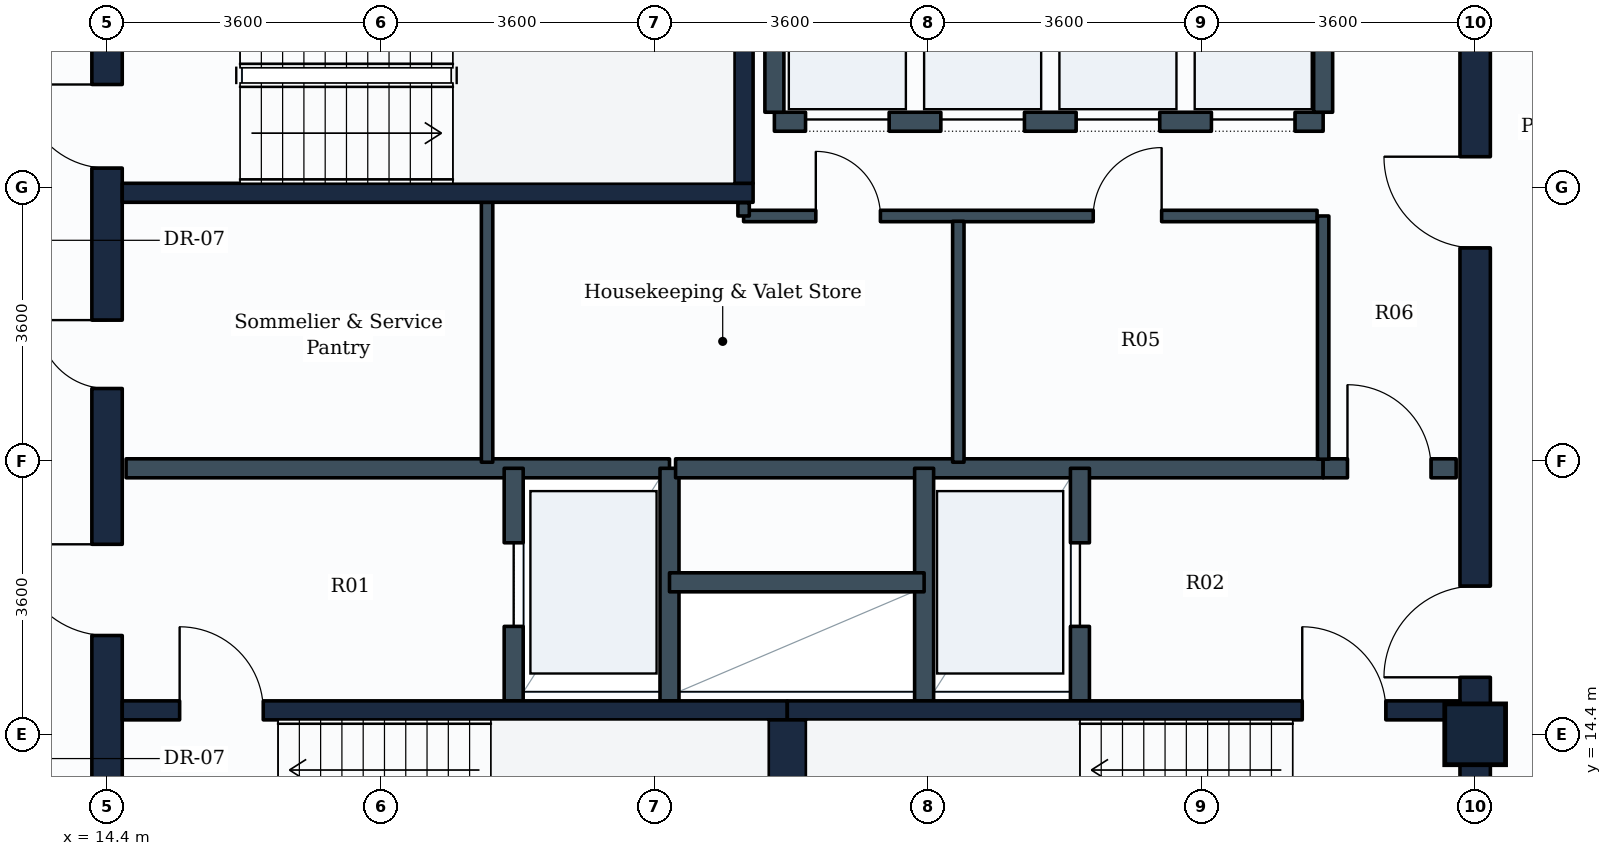
"""IFC4 building model, lengths in metres.
Left out: names, types, materials, properties, quantities, classifications, styles, units other than length and angle.
Written with IfcOpenShell. Run it as: python <this file> out.ifc"""

import sys

from ifc_helpers import new_model, si_unit, direction, frame, frame_2d, origin, origin_2d, place, context, subcontext, project, spatial, rectangle, extrude, element, fill, save


model = new_model("IFC4")
c1 = context("Model", 3, precision=1e-05, world=origin(), true_north=direction((0.0, 1.0)))
c2 = subcontext(c1, "Body", "Model", "MODEL_VIEW")
j1 = project(units=[si_unit("LENGTHUNIT", "METRE"), si_unit("PLANEANGLEUNIT", "RADIAN")], contexts=[c1])
p1 = place(None, origin())
s1 = spatial("IfcSite", under=j1, at=p1, CompositionType="ELEMENT")
p2 = place(p1, origin())
s2 = spatial("IfcBuilding", under=s1, at=p2, CompositionType="ELEMENT")
p3 = place(p2, frame((0.0, 0.0, 277.4)))
s3 = spatial("IfcBuildingStorey", under=s2, at=p3, CompositionType="ELEMENT", Elevation=277.4)
p4 = place(p3, frame((32.4, 14.4, 0.0), z_axis=(0.0, 0.0, 1.0), x_axis=(1.0, 0.0, 0.0)))
e1 = element("IfcColumn", 1, at=p4, inside=s3, PredefinedType="COLUMN", context=c2, shape_type="SweptSolid", body=[
    extrude(rectangle(XDim=0.8, YDim=0.8, at=origin_2d()), origin(), (0.0, 0.0, 1.0), 3.6),
])
p5 = place(p3, frame((14.4, 10.8, 0.0), z_axis=(0.0, 0.0, 1.0), x_axis=(0.0, 1.0, 0.0)))
e2 = element("IfcWall", 2, at=p5, inside=s3, PredefinedType="SHEAR", context=c2, shape_type="SweptSolid", body=[
    extrude(rectangle(XDim=14.4, YDim=0.4, at=frame_2d((7.2, 0.0))), origin(), (0.0, 0.0, 1.0), 3.35),
])
p6 = place(p5, frame((11.05, 0.0, 0.0)))
e3 = element("IfcOpeningElement", 3, at=p6, cuts=e2, PredefinedType="OPENING", context=c2, shape_type="SweptSolid", body=[
    extrude(rectangle(XDim=1.1, YDim=2.1, at=frame_2d((0.55, 1.05))), frame((0.0, 0.21, 0.0), z_axis=(0.0, -1.0, 0.0), x_axis=(1.0, 0.0, 0.0)), (0.0, 0.0, 1.0), 0.42),
])
p7 = place(p5, frame((4.9, 0.0, 0.0)))
e4 = element("IfcOpeningElement", 4, at=p7, cuts=e2, PredefinedType="OPENING", context=c2, shape_type="SweptSolid", body=[
    extrude(rectangle(XDim=1.2, YDim=2.1, at=frame_2d((0.6, 1.05))), frame((0.0, 0.21, 0.0), z_axis=(0.0, -1.0, 0.0), x_axis=(1.0, 0.0, 0.0)), (0.0, 0.0, 1.0), 0.42),
])
p8 = place(p5, frame((8.15, 0.0, 0.0)))
e5 = element("IfcOpeningElement", 5, at=p8, cuts=e2, PredefinedType="OPENING", context=c2, shape_type="SweptSolid", body=[
    extrude(rectangle(XDim=0.9, YDim=2.1, at=frame_2d((0.45, 1.05))), frame((0.0, 0.21, 0.0), z_axis=(0.0, -1.0, 0.0), x_axis=(1.0, 0.0, 0.0)), (0.0, 0.0, 1.0), 0.42),
])
p9 = place(p3, frame((32.4, 10.8, 0.0), z_axis=(0.0, 0.0, 1.0), x_axis=(0.0, 1.0, 0.0)))
e6 = element("IfcWall", 6, at=p9, inside=s3, PredefinedType="SHEAR", context=c2, shape_type="SweptSolid", body=[
    extrude(rectangle(XDim=14.4, YDim=0.4, at=frame_2d((7.2, 0.0))), origin(), (0.0, 0.0, 1.0), 3.35),
])
p10 = place(p9, frame((4.35, 0.0, 0.0)))
e7 = element("IfcOpeningElement", 7, at=p10, cuts=e6, PredefinedType="OPENING", context=c2, shape_type="SweptSolid", body=[
    extrude(rectangle(XDim=1.2, YDim=2.1, at=frame_2d((0.6, 1.05))), frame((0.0, 0.21, 0.0), z_axis=(0.0, -1.0, 0.0), x_axis=(1.0, 0.0, 0.0)), (0.0, 0.0, 1.0), 0.42),
])
p11 = place(p9, frame((10.0, 0.0, 0.0)))
e8 = element("IfcOpeningElement", 8, at=p11, cuts=e6, PredefinedType="OPENING", context=c2, shape_type="SweptSolid", body=[
    extrude(rectangle(XDim=1.2, YDim=2.1, at=frame_2d((0.6, 1.05))), frame((0.0, 0.21, 0.0), z_axis=(0.0, -1.0, 0.0), x_axis=(1.0, 0.0, 0.0)), (0.0, 0.0, 1.0), 0.42),
])
p12 = place(p3, frame((14.6, 14.715, 0.0), z_axis=(0.0, 0.0, 1.0), x_axis=(1.0, 0.0, 0.0)))
e9 = element("IfcWall", 9, at=p12, inside=s3, PredefinedType="SHEAR", context=c2, shape_type="SweptSolid", body=[
    extrude(rectangle(XDim=8.75, YDim=0.25, at=frame_2d((4.375, 0.0))), origin(), (0.0, 0.0, 1.0), 3.35),
])
p13 = place(p12, frame((0.755, 0.0, 0.0)))
e10 = element("IfcOpeningElement", 10, at=p13, cuts=e9, PredefinedType="OPENING", context=c2, shape_type="SweptSolid", body=[
    extrude(rectangle(XDim=1.1, YDim=2.1, at=frame_2d((0.55, 1.05))), frame((0.0, 0.135, 0.0), z_axis=(0.0, -1.0, 0.0), x_axis=(1.0, 0.0, 0.0)), (0.0, 0.0, 1.0), 0.27),
])
p14 = place(p3, frame((23.35, 14.715, 0.0), z_axis=(0.0, 0.0, 1.0), x_axis=(1.0, 0.0, 0.0)))
e11 = element("IfcWall", 11, at=p14, inside=s3, PredefinedType="SHEAR", context=c2, shape_type="SweptSolid", body=[
    extrude(rectangle(XDim=8.85, YDim=0.25, at=frame_2d((4.425, 0.0))), origin(), (0.0, 0.0, 1.0), 3.35),
])
p15 = place(p14, frame((6.775, 0.0, 0.0)))
e12 = element("IfcOpeningElement", 12, at=p15, cuts=e11, PredefinedType="OPENING", context=c2, shape_type="SweptSolid", body=[
    extrude(rectangle(XDim=1.1, YDim=2.1, at=frame_2d((0.55, 1.05))), frame((0.0, 0.135, 0.0), z_axis=(0.0, -1.0, 0.0), x_axis=(1.0, 0.0, 0.0)), (0.0, 0.0, 1.0), 0.27),
])
p16 = place(p3, frame((23.35, 11.75, 0.0), z_axis=(0.0, 0.0, 1.0), x_axis=(0.0, 1.0, 0.0)))
e13 = element("IfcWall", 13, at=p16, inside=s3, PredefinedType="SHEAR", context=c2, shape_type="SweptSolid", body=[
    extrude(rectangle(XDim=2.84, YDim=0.5, at=frame_2d((1.42, 0.0))), origin(), (0.0, 0.0, 1.0), 3.35),
])
p17 = place(p3, frame((14.6, 21.525, 0.0), z_axis=(0.0, 0.0, 1.0), x_axis=(1.0, 0.0, 0.0)))
e14 = element("IfcWall", 14, at=p17, inside=s3, PredefinedType="SHEAR", context=c2, shape_type="SweptSolid", body=[
    extrude(rectangle(XDim=8.3, YDim=0.25, at=frame_2d((4.15, 0.0))), origin(), (0.0, 0.0, 1.0), 3.35),
])
p18 = place(p3, frame((22.775, 21.65, 0.0), z_axis=(0.0, 0.0, 1.0), x_axis=(0.0, 1.0, 0.0)))
e15 = element("IfcWall", 15, at=p18, inside=s3, PredefinedType="SHEAR", context=c2, shape_type="SweptSolid", body=[
    extrude(rectangle(XDim=2.84, YDim=0.25, at=frame_2d((1.42, 0.0))), origin(), (0.0, 0.0, 1.0), 3.35),
])
p19 = place(p3, frame((14.65, 17.9, 0.0), z_axis=(0.0, 0.0, 1.0), x_axis=(1.0, 0.0, 0.0)))
e16 = element("IfcWall", 16, at=p19, inside=s3, PredefinedType="PARTITIONING", context=c2, shape_type="SweptSolid", body=[
    extrude(rectangle(XDim=7.15, YDim=0.25, at=frame_2d((3.575, 0.0))), origin(), (0.0, 0.0, 1.0), 3.335),
])
p20 = place(p3, frame((19.75, 14.84, 0.0), z_axis=(0.0, 0.0, 1.0), x_axis=(0.0, 1.0, 0.0)))
e17 = element("IfcWall", 17, at=p20, inside=s3, PredefinedType="PARTITIONING", context=c2, shape_type="SweptSolid", body=[
    extrude(rectangle(XDim=3.06, YDim=0.25, at=frame_2d((1.53, 0.0))), origin(), (0.0, 0.0, 1.0), 3.335),
])
p21 = place(p20, frame((0.98, 0.0, 0.0)))
e18 = element("IfcOpeningElement", 18, at=p21, cuts=e17, PredefinedType="OPENING", context=c2, shape_type="SweptSolid", body=[
    extrude(rectangle(XDim=1.1, YDim=2.1, at=frame_2d((0.55, 1.05))), frame((0.0, 0.135, 0.0), z_axis=(0.0, -1.0, 0.0), x_axis=(1.0, 0.0, 0.0)), (0.0, 0.0, 1.0), 0.27),
])
p22 = place(p3, frame((21.8, 14.84, 0.0), z_axis=(0.0, 0.0, 1.0), x_axis=(0.0, 1.0, 0.0)))
e19 = element("IfcWall", 19, at=p22, inside=s3, PredefinedType="PARTITIONING", context=c2, shape_type="SweptSolid", body=[
    extrude(rectangle(XDim=3.06, YDim=0.25, at=frame_2d((1.53, 0.0))), origin(), (0.0, 0.0, 1.0), 3.335),
])
p23 = place(p3, frame((21.88, 17.9, 0.0), z_axis=(0.0, 0.0, 1.0), x_axis=(1.0, 0.0, 0.0)))
e20 = element("IfcWall", 20, at=p23, inside=s3, PredefinedType="PARTITIONING", context=c2, shape_type="SweptSolid", body=[
    extrude(rectangle(XDim=8.52, YDim=0.25, at=frame_2d((4.26, 0.0))), origin(), (0.0, 0.0, 1.0), 3.335),
])
p24 = place(p3, frame((30.4, 17.9, 0.0), z_axis=(0.0, 0.0, 1.0), x_axis=(1.0, 0.0, 0.0)))
e21 = element("IfcWall", 21, at=p24, inside=s3, PredefinedType="PARTITIONING", context=c2, shape_type="SweptSolid", body=[
    extrude(rectangle(XDim=1.75, YDim=0.25, at=frame_2d((0.875, 0.0))), origin(), (0.0, 0.0, 1.0), 3.335),
])
p25 = place(p24, frame((0.32, 0.0, 0.0)))
e22 = element("IfcOpeningElement", 22, at=p25, cuts=e21, PredefinedType="OPENING", context=c2, shape_type="SweptSolid", body=[
    extrude(rectangle(XDim=1.1, YDim=2.1, at=frame_2d((0.55, 1.05))), frame((0.0, 0.135, 0.0), z_axis=(0.0, -1.0, 0.0), x_axis=(1.0, 0.0, 0.0)), (0.0, 0.0, 1.0), 0.27),
])
p26 = place(p3, frame((25.15, 14.84, 0.0), z_axis=(0.0, 0.0, 1.0), x_axis=(0.0, 1.0, 0.0)))
e23 = element("IfcWall", 23, at=p26, inside=s3, PredefinedType="PARTITIONING", context=c2, shape_type="SweptSolid", body=[
    extrude(rectangle(XDim=3.06, YDim=0.25, at=frame_2d((1.53, 0.0))), origin(), (0.0, 0.0, 1.0), 3.335),
])
p27 = place(p3, frame((27.2, 14.84, 0.0), z_axis=(0.0, 0.0, 1.0), x_axis=(0.0, 1.0, 0.0)))
e24 = element("IfcWall", 24, at=p27, inside=s3, PredefinedType="PARTITIONING", context=c2, shape_type="SweptSolid", body=[
    extrude(rectangle(XDim=3.06, YDim=0.25, at=frame_2d((1.53, 0.0))), origin(), (0.0, 0.0, 1.0), 3.335),
])
p28 = place(p27, frame((0.98, 0.0, 0.0)))
e25 = element("IfcOpeningElement", 25, at=p28, cuts=e24, PredefinedType="OPENING", context=c2, shape_type="SweptSolid", body=[
    extrude(rectangle(XDim=1.1, YDim=2.1, at=frame_2d((0.55, 1.05))), frame((0.0, 0.135, 0.0), z_axis=(0.0, -1.0, 0.0), x_axis=(1.0, 0.0, 0.0)), (0.0, 0.0, 1.0), 0.27),
])
p29 = place(p3, frame((21.8, 16.4, 0.0), z_axis=(0.0, 0.0, 1.0), x_axis=(1.0, 0.0, 0.0)))
e26 = element("IfcWall", 26, at=p29, inside=s3, PredefinedType="PARTITIONING", context=c2, shape_type="SweptSolid", body=[
    extrude(rectangle(XDim=3.35, YDim=0.25, at=frame_2d((1.675, 0.0))), origin(), (0.0, 0.0, 1.0), 3.335),
])
p30 = place(p3, frame((23.18, 22.46, 0.0), z_axis=(0.0, 0.0, 1.0), x_axis=(1.0, 0.0, 0.0)))
e27 = element("IfcWall", 27, at=p30, inside=s3, PredefinedType="PARTITIONING", context=c2, shape_type="SweptSolid", body=[
    extrude(rectangle(XDim=7.22, YDim=0.25, at=frame_2d((3.61, 0.0))), origin(), (0.0, 0.0, 1.0), 3.335),
])
p31 = place(p30, frame((0.41, 0.0, 0.0)))
e28 = element("IfcOpeningElement", 28, at=p31, cuts=e27, PredefinedType="OPENING", context=c2, shape_type="SweptSolid", body=[
    extrude(rectangle(XDim=1.1, YDim=2.1, at=frame_2d((0.55, 1.05))), frame((0.0, 0.135, 0.0), z_axis=(0.0, -1.0, 0.0), x_axis=(1.0, 0.0, 0.0)), (0.0, 0.0, 1.0), 0.27),
])
p32 = place(p30, frame((2.19, 0.0, 0.0)))
e29 = element("IfcOpeningElement", 29, at=p32, cuts=e27, PredefinedType="OPENING", context=c2, shape_type="SweptSolid", body=[
    extrude(rectangle(XDim=1.1, YDim=2.1, at=frame_2d((0.55, 1.05))), frame((0.0, 0.135, 0.0), z_axis=(0.0, -1.0, 0.0), x_axis=(1.0, 0.0, 0.0)), (0.0, 0.0, 1.0), 0.27),
])
p33 = place(p30, frame((3.97, 0.0, 0.0)))
e30 = element("IfcOpeningElement", 30, at=p33, cuts=e27, PredefinedType="OPENING", context=c2, shape_type="SweptSolid", body=[
    extrude(rectangle(XDim=1.1, YDim=2.1, at=frame_2d((0.55, 1.05))), frame((0.0, 0.135, 0.0), z_axis=(0.0, -1.0, 0.0), x_axis=(1.0, 0.0, 0.0)), (0.0, 0.0, 1.0), 0.27),
])
p34 = place(p30, frame((5.75, 0.0, 0.0)))
e31 = element("IfcOpeningElement", 31, at=p34, cuts=e27, PredefinedType="OPENING", context=c2, shape_type="SweptSolid", body=[
    extrude(rectangle(XDim=1.1, YDim=2.1, at=frame_2d((0.55, 1.05))), frame((0.0, 0.135, 0.0), z_axis=(0.0, -1.0, 0.0), x_axis=(1.0, 0.0, 0.0)), (0.0, 0.0, 1.0), 0.27),
])
for number, where, z_axis, x_axis in (
    (32, (23.18, 22.585, 0.0), (0.0, 0.0, 1.0), (0.0, 1.0, 0.0)),
    (33, (30.4, 22.585, 0.0), (0.0, 0.0, 1.0), (0.0, 1.0, 0.0)),
):
    element("IfcWall", number, at=place(p3, frame(where, z_axis=z_axis, x_axis=x_axis)), inside=s3, PredefinedType="PARTITIONING", context=c2, shape_type="SweptSolid", body=[
        extrude(rectangle(XDim=2.315, YDim=0.25, at=frame_2d((1.157, 0.0))), origin(), (0.0, 0.0, 1.0), 3.335),
    ])
p35 = place(p3, frame((22.775, 21.22, 0.0), z_axis=(0.0, 0.0, 1.0), x_axis=(1.0, 0.0, 0.0)))
e34 = element("IfcWall", 34, at=p35, inside=s3, PredefinedType="PARTITIONING", context=c2, shape_type="SweptSolid", body=[
    extrude(rectangle(XDim=7.545, YDim=0.15, at=frame_2d((3.772, 0.0))), origin(), (0.0, 0.0, 1.0), 3.335),
])
p36 = place(p35, frame((0.95, 0.0, 0.0)))
e35 = element("IfcOpeningElement", 35, at=p36, cuts=e34, PredefinedType="OPENING", context=c2, shape_type="SweptSolid", body=[
    extrude(rectangle(XDim=0.85, YDim=2.1, at=frame_2d((0.425, 1.05))), frame((0.0, 0.085, 0.0), z_axis=(0.0, -1.0, 0.0), x_axis=(1.0, 0.0, 0.0)), (0.0, 0.0, 1.0), 0.17),
])
p37 = place(p35, frame((4.6, 0.0, 0.0)))
e36 = element("IfcOpeningElement", 36, at=p37, cuts=e34, PredefinedType="OPENING", context=c2, shape_type="SweptSolid", body=[
    extrude(rectangle(XDim=0.9, YDim=2.1, at=frame_2d((0.45, 1.05))), frame((0.0, 0.085, 0.0), z_axis=(0.0, -1.0, 0.0), x_axis=(1.0, 0.0, 0.0)), (0.0, 0.0, 1.0), 0.17),
])
p38 = place(p3, frame((22.775, 21.22, 0.0), z_axis=(0.0, 0.0, 1.0), x_axis=(0.0, 1.0, 0.0)))
e37 = element("IfcWall", 37, at=p38, inside=s3, PredefinedType="PARTITIONING", context=c2, shape_type="SweptSolid", body=[
    extrude(rectangle(XDim=0.175, YDim=0.15, at=frame_2d((0.087, 0.0))), origin(), (0.0, 0.0, 1.0), 3.335),
])
p39 = place(p3, frame((30.4, 18.02, 0.0), z_axis=(0.0, 0.0, 1.0), x_axis=(0.0, 1.0, 0.0)))
e38 = element("IfcWall", 38, at=p39, inside=s3, PredefinedType="PARTITIONING", context=c2, shape_type="SweptSolid", body=[
    extrude(rectangle(XDim=3.2, YDim=0.15, at=frame_2d((1.6, 0.0))), origin(), (0.0, 0.0, 1.0), 3.335),
])
p40 = place(p3, frame((19.4, 17.98, 0.0), z_axis=(0.0, 0.0, 1.0), x_axis=(0.0, 1.0, 0.0)))
e39 = element("IfcWall", 39, at=p40, inside=s3, PredefinedType="PARTITIONING", context=c2, shape_type="SweptSolid", body=[
    extrude(rectangle(XDim=3.42, YDim=0.15, at=frame_2d((1.71, 0.0))), origin(), (0.0, 0.0, 1.0), 3.335),
])
p41 = place(p3, frame((25.6, 17.98, 0.0), z_axis=(0.0, 0.0, 1.0), x_axis=(0.0, 1.0, 0.0)))
e40 = element("IfcWall", 40, at=p41, inside=s3, PredefinedType="PARTITIONING", context=c2, shape_type="SweptSolid", body=[
    extrude(rectangle(XDim=3.17, YDim=0.15, at=frame_2d((1.585, 0.0))), origin(), (0.0, 0.0, 1.0), 3.335),
])
p42 = place(p13, origin())
e41 = element("IfcDoor", 41, at=p42, inside=s3, OperationType="SINGLE_SWING_LEFT", PredefinedType="DOOR", context=c2, shape_type="SweptSolid", body=[
    extrude(rectangle(XDim=1.1, YDim=2.1, at=frame_2d((0.55, 1.05))), frame((0.0, 0.025, 0.0), z_axis=(0.0, -1.0, 0.0), x_axis=(1.0, 0.0, 0.0)), (0.0, 0.0, 1.0), 0.05),
])
fill(e10, e41)
p43 = place(p15, origin())
e42 = element("IfcDoor", 42, at=p43, inside=s3, OperationType="SINGLE_SWING_LEFT", PredefinedType="DOOR", context=c2, shape_type="SweptSolid", body=[
    extrude(rectangle(XDim=1.1, YDim=2.1, at=frame_2d((0.55, 1.05))), frame((0.0, 0.025, 0.0), z_axis=(0.0, -1.0, 0.0), x_axis=(1.0, 0.0, 0.0)), (0.0, 0.0, 1.0), 0.05),
])
fill(e12, e42)
p44 = place(p6, origin())
e43 = element("IfcDoor", 43, at=p44, inside=s3, OperationType="SINGLE_SWING_RIGHT", PredefinedType="DOOR", context=c2, shape_type="SweptSolid", body=[
    extrude(rectangle(XDim=1.1, YDim=2.1, at=frame_2d((0.55, 1.05))), frame((0.0, 0.025, 0.0), z_axis=(0.0, -1.0, 0.0), x_axis=(1.0, 0.0, 0.0)), (0.0, 0.0, 1.0), 0.05),
])
fill(e3, e43)
p45 = place(p21, origin())
e44 = element("IfcDoor", 44, at=p45, inside=s3, OperationType="SLIDING_TO_LEFT", PredefinedType="DOOR", context=c2, shape_type="SweptSolid", body=[
    extrude(rectangle(XDim=1.1, YDim=2.1, at=frame_2d((0.55, 1.05))), frame((0.0, 0.025, 0.0), z_axis=(0.0, -1.0, 0.0), x_axis=(1.0, 0.0, 0.0)), (0.0, 0.0, 1.0), 0.05),
])
fill(e18, e44)
p46 = place(p28, origin())
e45 = element("IfcDoor", 45, at=p46, inside=s3, OperationType="SLIDING_TO_LEFT", PredefinedType="DOOR", context=c2, shape_type="SweptSolid", body=[
    extrude(rectangle(XDim=1.1, YDim=2.1, at=frame_2d((0.55, 1.05))), frame((0.0, 0.025, 0.0), z_axis=(0.0, -1.0, 0.0), x_axis=(1.0, 0.0, 0.0)), (0.0, 0.0, 1.0), 0.05),
])
fill(e25, e45)
p47 = place(p7, origin())
e46 = element("IfcDoor", 46, at=p47, inside=s3, OperationType="SINGLE_SWING_RIGHT", PredefinedType="DOOR", context=c2, shape_type="SweptSolid", body=[
    extrude(rectangle(XDim=1.2, YDim=2.1, at=frame_2d((0.6, 1.05))), frame((0.0, 0.025, 0.0), z_axis=(0.0, -1.0, 0.0), x_axis=(1.0, 0.0, 0.0)), (0.0, 0.0, 1.0), 0.05),
])
fill(e4, e46)
p48 = place(p10, origin())
e47 = element("IfcDoor", 47, at=p48, inside=s3, OperationType="SINGLE_SWING_LEFT", PredefinedType="DOOR", context=c2, shape_type="SweptSolid", body=[
    extrude(rectangle(XDim=1.2, YDim=2.1, at=frame_2d((0.6, 1.05))), frame((0.0, 0.025, 0.0), z_axis=(0.0, -1.0, 0.0), x_axis=(1.0, 0.0, 0.0)), (0.0, 0.0, 1.0), 0.05),
])
fill(e7, e47)
p49 = place(p25, origin())
e48 = element("IfcDoor", 48, at=p49, inside=s3, OperationType="SINGLE_SWING_LEFT", PredefinedType="DOOR", context=c2, shape_type="SweptSolid", body=[
    extrude(rectangle(XDim=1.1, YDim=2.1, at=frame_2d((0.55, 1.05))), frame((0.0, 0.025, 0.0), z_axis=(0.0, -1.0, 0.0), x_axis=(1.0, 0.0, 0.0)), (0.0, 0.0, 1.0), 0.05),
])
fill(e22, e48)
p50 = place(p31, origin())
e49 = element("IfcDoor", 49, at=p50, inside=s3, OperationType="SLIDING_TO_LEFT", PredefinedType="DOOR", context=c2, shape_type="SweptSolid", body=[
    extrude(rectangle(XDim=1.1, YDim=2.1, at=frame_2d((0.55, 1.05))), frame((0.0, 0.025, 0.0), z_axis=(0.0, -1.0, 0.0), x_axis=(1.0, 0.0, 0.0)), (0.0, 0.0, 1.0), 0.05),
])
fill(e28, e49)
p51 = place(p32, origin())
e50 = element("IfcDoor", 50, at=p51, inside=s3, OperationType="SLIDING_TO_LEFT", PredefinedType="DOOR", context=c2, shape_type="SweptSolid", body=[
    extrude(rectangle(XDim=1.1, YDim=2.1, at=frame_2d((0.55, 1.05))), frame((0.0, 0.025, 0.0), z_axis=(0.0, -1.0, 0.0), x_axis=(1.0, 0.0, 0.0)), (0.0, 0.0, 1.0), 0.05),
])
fill(e29, e50)
p52 = place(p33, origin())
e51 = element("IfcDoor", 51, at=p52, inside=s3, OperationType="SLIDING_TO_LEFT", PredefinedType="DOOR", context=c2, shape_type="SweptSolid", body=[
    extrude(rectangle(XDim=1.1, YDim=2.1, at=frame_2d((0.55, 1.05))), frame((0.0, 0.025, 0.0), z_axis=(0.0, -1.0, 0.0), x_axis=(1.0, 0.0, 0.0)), (0.0, 0.0, 1.0), 0.05),
])
fill(e30, e51)
p53 = place(p34, origin())
e52 = element("IfcDoor", 52, at=p53, inside=s3, OperationType="SLIDING_TO_LEFT", PredefinedType="DOOR", context=c2, shape_type="SweptSolid", body=[
    extrude(rectangle(XDim=1.1, YDim=2.1, at=frame_2d((0.55, 1.05))), frame((0.0, 0.025, 0.0), z_axis=(0.0, -1.0, 0.0), x_axis=(1.0, 0.0, 0.0)), (0.0, 0.0, 1.0), 0.05),
])
fill(e31, e52)
p54 = place(p11, origin())
e53 = element("IfcDoor", 53, at=p54, inside=s3, OperationType="SINGLE_SWING_RIGHT", PredefinedType="DOOR", context=c2, shape_type="SweptSolid", body=[
    extrude(rectangle(XDim=1.2, YDim=2.1, at=frame_2d((0.6, 1.05))), frame((0.0, 0.025, 0.0), z_axis=(0.0, -1.0, 0.0), x_axis=(1.0, 0.0, 0.0)), (0.0, 0.0, 1.0), 0.05),
])
fill(e8, e53)
p55 = place(p8, origin())
e54 = element("IfcDoor", 54, at=p55, inside=s3, OperationType="SINGLE_SWING_RIGHT", PredefinedType="DOOR", context=c2, shape_type="SweptSolid", body=[
    extrude(rectangle(XDim=0.9, YDim=2.1, at=frame_2d((0.45, 1.05))), frame((0.0, 0.025, 0.0), z_axis=(0.0, -1.0, 0.0), x_axis=(1.0, 0.0, 0.0)), (0.0, 0.0, 1.0), 0.05),
])
fill(e5, e54)
p56 = place(p36, origin())
e55 = element("IfcDoor", 55, at=p56, inside=s3, OperationType="SINGLE_SWING_LEFT", PredefinedType="DOOR", context=c2, shape_type="SweptSolid", body=[
    extrude(rectangle(XDim=0.85, YDim=2.1, at=frame_2d((0.425, 1.05))), frame((0.0, 0.025, 0.0), z_axis=(0.0, -1.0, 0.0), x_axis=(1.0, 0.0, 0.0)), (0.0, 0.0, 1.0), 0.05),
])
fill(e35, e55)
p57 = place(p37, origin())
e56 = element("IfcDoor", 56, at=p57, inside=s3, OperationType="SINGLE_SWING_RIGHT", PredefinedType="DOOR", context=c2, shape_type="SweptSolid", body=[
    extrude(rectangle(XDim=0.9, YDim=2.1, at=frame_2d((0.45, 1.05))), frame((0.0, 0.025, 0.0), z_axis=(0.0, -1.0, 0.0), x_axis=(1.0, 0.0, 0.0)), (0.0, 0.0, 1.0), 0.05),
])
fill(e36, e56)
save(model, sys.argv[1])
